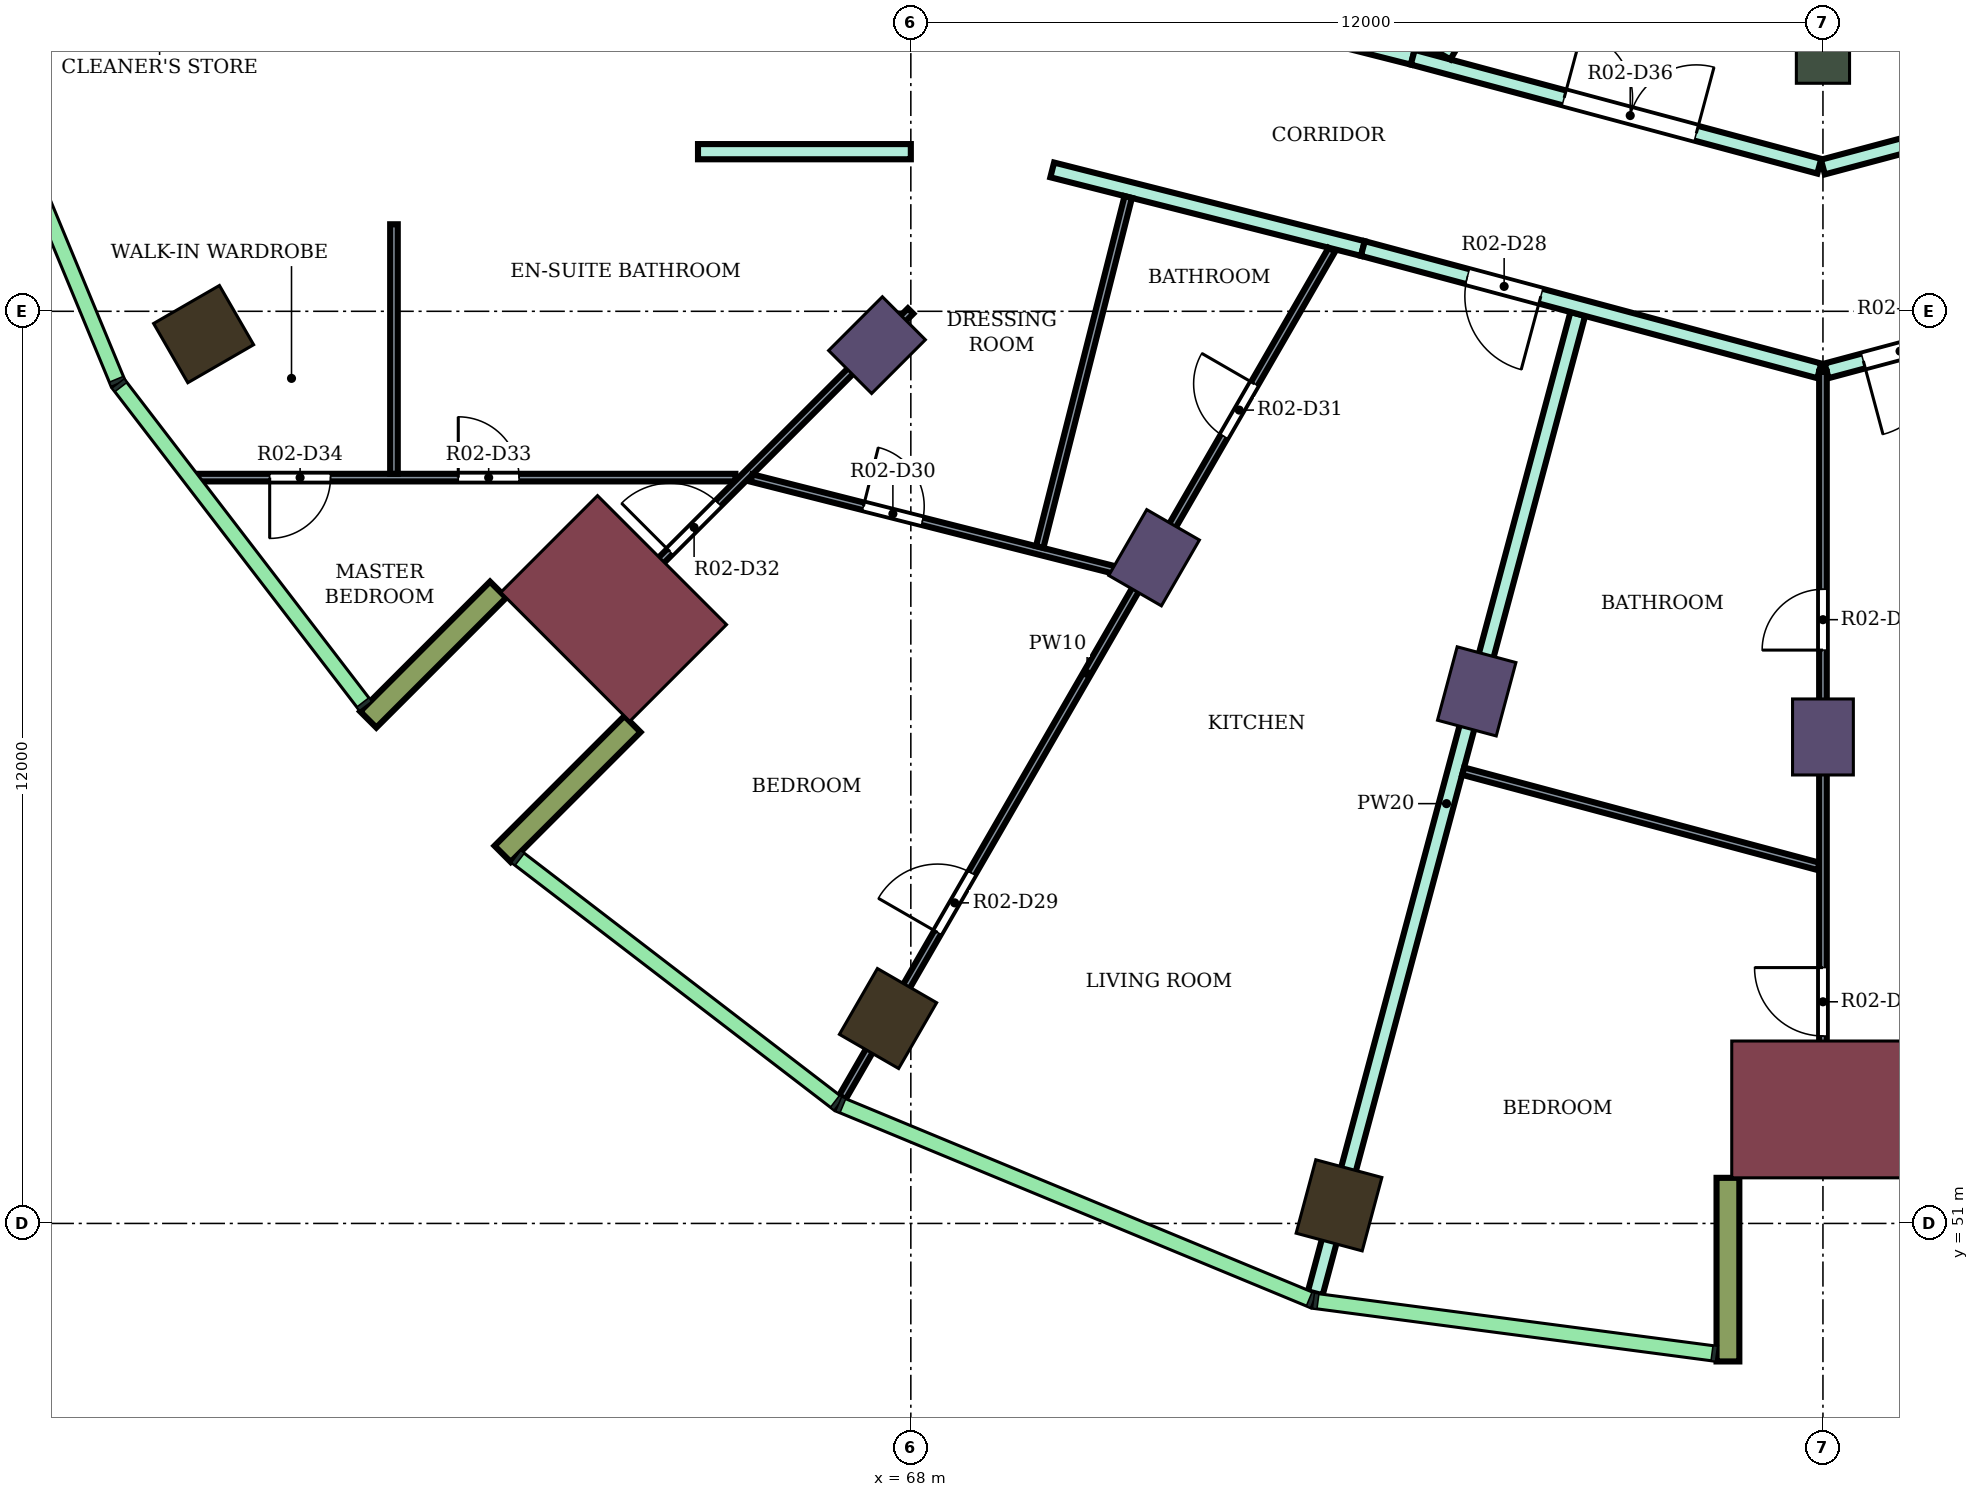
"""IFC4 building model, lengths in metres.
Left out: names, types, materials, properties, quantities, classifications, styles, units other than length and angle.
Written with IfcOpenShell. Run it as: python <this file> out.ifc"""

import sys

from ifc_helpers import new_model, si_unit, direction, frame, frame_2d, origin, origin_2d, place, context, subcontext, project, spatial, rectangle, extrude, element, fill, save


model = new_model("IFC4")
c1 = context("Model", 3, precision=1e-05, world=origin(), true_north=direction((0.0, 1.0)))
c2 = subcontext(c1, "Body", "Model", "MODEL_VIEW")
j1 = project(units=[si_unit("LENGTHUNIT", "METRE"), si_unit("PLANEANGLEUNIT", "RADIAN")], contexts=[c1])
p1 = place(None, origin())
s1 = spatial("IfcSite", under=j1, at=p1, CompositionType="ELEMENT")
p2 = place(p1, origin())
s2 = spatial("IfcBuilding", under=s1, at=p2, CompositionType="ELEMENT")
p3 = place(p2, frame((0.0, 0.0, 178.2)))
s3 = spatial("IfcBuildingStorey", under=s2, at=p3, CompositionType="ELEMENT", Elevation=178.2)
for number, where, z_axis, x_axis in (
    (1, (58.696, 62.7, 0.0), (0.0, 0.0, 1.0), (-0.866, -0.5, 0.0)),
    (2, (67.7, 53.696, 0.0), (0.0, 0.0, 1.0), (-0.5, -0.866, 0.0)),
    (3, (73.633, 51.238, 0.0), (0.0, 0.0, 1.0), (-0.259, -0.966, 0.0)),
):
    element("IfcColumn", number, at=place(p3, frame(where, z_axis=z_axis, x_axis=x_axis)), inside=s3, PredefinedType="COLUMN", context=c2, shape_type="SweptSolid", body=[
        extrude(rectangle(XDim=1.0, YDim=0.9, at=origin_2d()), origin(), (0.0, 0.0, 1.0), 4.1),
    ])
for number, where, z_axis, x_axis in (
    (4, (67.555, 62.555, 0.0), (0.0, 0.0, 1.0), (-0.707, -0.707, 0.0)),
    (5, (71.2, 59.758, 0.0), (0.0, 0.0, 1.0), (-0.5, -0.866, 0.0)),
    (6, (75.445, 58.0, 0.0), (0.0, 0.0, 1.0), (-0.259, -0.966, 0.0)),
    (7, (80.0, 57.4, 0.0), (0.0, 0.0, 1.0), (0.0, -1.0, 0.0)),
):
    element("IfcColumn", number, at=place(p3, frame(where, z_axis=z_axis, x_axis=x_axis)), inside=s3, PredefinedType="COLUMN", context=c2, shape_type="SweptSolid", body=[
        extrude(rectangle(XDim=1.0, YDim=0.8, at=origin_2d()), origin(), (0.0, 0.0, 1.0), 4.1),
    ])
p4 = place(p3, frame((80.0, 66.4, 0.0), z_axis=(0.0, 0.0, 1.0), x_axis=(0.0, -1.0, 0.0)))
e8 = element("IfcColumn", 8, at=p4, inside=s3, PredefinedType="COLUMN", context=c2, shape_type="SweptSolid", body=[
    extrude(rectangle(XDim=0.8, YDim=0.7, at=origin_2d()), origin(), (0.0, 0.0, 1.0), 4.1),
])
for number, where, z_axis, x_axis in (
    (9, (64.09, 59.09, 0.0), (0.0, 0.0, 1.0), (-0.707, -0.707, 0.0)),
    (10, (80.0, 52.5, 0.0), (0.0, 0.0, 1.0), (0.0, -1.0, 0.0)),
):
    element("IfcColumn", number, at=place(p3, frame(where, z_axis=z_axis, x_axis=x_axis)), inside=s3, PredefinedType="COLUMN", context=c2, shape_type="SweptSolid", body=[
        extrude(rectangle(XDim=1.8, YDim=2.4, at=origin_2d()), origin(), (0.0, 0.0, 1.0), 4.1),
    ])
for number, where, z_axis, x_axis in (
    (11, (62.57, 59.338, 0.0), (0.0, 0.0, 1.0), (-0.707, -0.707, 0.0)),
    (12, (64.338, 57.57, 0.0), (0.0, 0.0, 1.0), (-0.707, -0.707, 0.0)),
    (13, (78.75, 51.6, 0.0), (0.0, 0.0, 1.0), (0.0, -1.0, 0.0)),
):
    element("IfcWall", number, at=place(p3, frame(where, z_axis=z_axis, x_axis=x_axis)), inside=s3, PredefinedType="NOTDEFINED", context=c2, shape_type="SweptSolid", body=[
        extrude(rectangle(XDim=2.416, YDim=0.3, at=frame_2d((1.208, 0.0))), origin(), (0.0, 0.0, 1.0), 4.1),
    ])
p5 = place(p3, frame((65.2, 65.1, 0.0), z_axis=(0.0, 0.0, 1.0), x_axis=(1.0, 0.0, 0.0)))
e14 = element("IfcWall", 14, at=p5, inside=s3, PredefinedType="PARTITIONING", context=c2, shape_type="SweptSolid", body=[
    extrude(rectangle(XDim=2.8, YDim=0.2, at=frame_2d((1.4, 0.0))), origin(), (0.0, 0.0, 1.0), 3.65),
])
p6 = place(p3, frame((69.86, 64.86, 0.0), z_axis=(0.0, 0.0, 1.0), x_axis=(0.96942980222, -0.245368821506, 0.0)))
e15 = element("IfcWall", 15, at=p6, inside=s3, PredefinedType="PARTITIONING", context=c2, shape_type="SweptSolid", body=[
    extrude(rectangle(XDim=4.216, YDim=0.2, at=frame_2d((2.108, 0.0))), origin(), (0.0, 0.0, 1.0), 3.65),
])
p7 = place(p3, frame((72.1, 66.975, 0.0), z_axis=(0.0, 0.0, 1.0), x_axis=(0.969471314457, -0.245204752086, 0.0)))
e16 = element("IfcWall", 16, at=p7, inside=s3, PredefinedType="PARTITIONING", context=c2, shape_type="SweptSolid", body=[
    extrude(rectangle(XDim=2.582, YDim=0.2, at=frame_2d((1.291, 0.0))), origin(), (0.0, 0.0, 1.0), 3.65),
])
p8 = place(p7, frame((0.841, 0.0, 0.0)))
e17 = element("IfcOpeningElement", 17, at=p8, cuts=e16, PredefinedType="OPENING", context=c2, shape_type="SweptSolid", body=[
    extrude(rectangle(XDim=0.9, YDim=2.1, at=frame_2d((0.45, 1.05))), frame((0.0, 0.11, 0.0), z_axis=(0.0, -1.0, 0.0), x_axis=(1.0, 0.0, 0.0)), (0.0, 0.0, 1.0), 0.22),
])
p9 = place(p3, frame((73.321, 50.081, 0.0), z_axis=(0.0, 0.0, 1.0), x_axis=(0.258926994059, 0.965896894988, 0.0)))
e18 = element("IfcWall", 18, at=p9, inside=s3, PredefinedType="PARTITIONING", context=c2, shape_type="SweptSolid", body=[
    extrude(rectangle(XDim=13.338, YDim=0.2, at=frame_2d((6.669, 0.0))), origin(), (0.0, 0.0, 1.0), 3.65),
])
p10 = place(p3, frame((73.947, 63.826, 0.0), z_axis=(0.0, 0.0, 1.0), x_axis=(0.965908253407, -0.258884619088, 0.0)))
e19 = element("IfcWall", 19, at=p10, inside=s3, PredefinedType="PARTITIONING", context=c2, shape_type="SweptSolid", body=[
    extrude(rectangle(XDim=6.217, YDim=0.2, at=frame_2d((3.108, 0.0))), origin(), (0.0, 0.0, 1.0), 3.65),
])
p11 = place(p10, frame((1.424, 0.0, 0.0)))
e20 = element("IfcOpeningElement", 20, at=p11, cuts=e19, PredefinedType="OPENING", context=c2, shape_type="SweptSolid", body=[
    extrude(rectangle(XDim=1.0, YDim=2.1, at=frame_2d((0.5, 1.05))), frame((0.0, 0.11, 0.0), z_axis=(0.0, -1.0, 0.0), x_axis=(1.0, 0.0, 0.0)), (0.0, 0.0, 1.0), 0.22),
])
p12 = place(p3, frame((74.603, 66.342, 0.0), z_axis=(0.0, 0.0, 1.0), x_axis=(0.965895298152, -0.258932950796, 0.0)))
e21 = element("IfcWall", 21, at=p12, inside=s3, PredefinedType="PARTITIONING", context=c2, shape_type="SweptSolid", body=[
    extrude(rectangle(XDim=5.538, YDim=0.2, at=frame_2d((2.769, 0.0))), origin(), (0.0, 0.0, 1.0), 3.65),
])
p13 = place(p12, frame((2.062, 0.0, 0.0)))
e22 = element("IfcOpeningElement", 22, at=p13, cuts=e21, PredefinedType="OPENING", context=c2, shape_type="SweptSolid", body=[
    extrude(rectangle(XDim=1.8, YDim=2.1, at=frame_2d((0.9, 1.05))), frame((0.0, 0.11, 0.0), z_axis=(0.0, -1.0, 0.0), x_axis=(1.0, 0.0, 0.0)), (0.0, 0.0, 1.0), 0.22),
])
p14 = place(p3, frame((75.012, 66.363, 0.0), z_axis=(0.0, 0.0, 1.0), x_axis=(0.500168489725, 0.86592810434, 0.0)))
e23 = element("IfcWall", 23, at=p14, inside=s3, PredefinedType="PARTITIONING", context=c2, shape_type="SweptSolid", body=[
    extrude(rectangle(XDim=2.274, YDim=0.2, at=frame_2d((1.137, 0.0))), origin(), (0.0, 0.0, 1.0), 3.65),
])
p15 = place(p3, frame((80.0, 64.898, 0.0), z_axis=(0.0, 0.0, 1.0), x_axis=(0.966237419782, 0.257653349704, 0.0)))
e24 = element("IfcWall", 24, at=p15, inside=s3, PredefinedType="PARTITIONING", context=c2, shape_type="SweptSolid", body=[
    extrude(rectangle(XDim=8.169, YDim=0.2, at=frame_2d((4.084, 0.0))), origin(), (0.0, 0.0, 1.0), 3.65),
])
p16 = place(p15, frame((6.428, 0.0, 0.0)))
e25 = element("IfcOpeningElement", 25, at=p16, cuts=e24, PredefinedType="OPENING", context=c2, shape_type="SweptSolid", body=[
    extrude(rectangle(XDim=0.9, YDim=2.1, at=frame_2d((0.45, 1.05))), frame((0.0, 0.11, 0.0), z_axis=(0.0, -1.0, 0.0), x_axis=(1.0, 0.0, 0.0)), (0.0, 0.0, 1.0), 0.22),
])
p17 = place(p3, frame((80.048, 62.217, 0.0), z_axis=(0.0, 0.0, 1.0), x_axis=(0.965941520544, 0.258760466242, 0.0)))
e26 = element("IfcWall", 26, at=p17, inside=s3, PredefinedType="PARTITIONING", context=c2, shape_type="SweptSolid", body=[
    extrude(rectangle(XDim=6.006, YDim=0.2, at=frame_2d((3.003, 0.0))), origin(), (0.0, 0.0, 1.0), 3.65),
])
p18 = place(p17, frame((0.5, 0.0, 0.0)))
e27 = element("IfcOpeningElement", 27, at=p18, cuts=e26, PredefinedType="OPENING", context=c2, shape_type="SweptSolid", body=[
    extrude(rectangle(XDim=1.0, YDim=2.1, at=frame_2d((0.5, 1.05))), frame((0.0, 0.11, 0.0), z_axis=(0.0, -1.0, 0.0), x_axis=(1.0, 0.0, 0.0)), (0.0, 0.0, 1.0), 0.22),
])
p19 = place(p3, frame((58.6, 60.812, 0.0), z_axis=(0.0, 0.0, 1.0), x_axis=(1.0, 0.0, 0.0)))
e28 = element("IfcWall", 28, at=p19, inside=s3, PredefinedType="PARTITIONING", context=c2, shape_type="SweptSolid", body=[
    extrude(rectangle(XDim=7.092, YDim=0.1, at=frame_2d((3.546, 0.0))), origin(), (0.0, 0.0, 1.0), 3.65),
])
p20 = place(p19, frame((3.446, 0.0, 0.0)))
e29 = element("IfcOpeningElement", 29, at=p20, cuts=e28, PredefinedType="OPENING", context=c2, shape_type="SweptSolid", body=[
    extrude(rectangle(XDim=0.8, YDim=2.1, at=frame_2d((0.4, 1.05))), frame((0.0, 0.06, 0.0), z_axis=(0.0, -1.0, 0.0), x_axis=(1.0, 0.0, 0.0)), (0.0, 0.0, 1.0), 0.12),
])
p21 = place(p19, frame((0.965, 0.0, 0.0)))
e30 = element("IfcOpeningElement", 30, at=p21, cuts=e28, PredefinedType="OPENING", context=c2, shape_type="SweptSolid", body=[
    extrude(rectangle(XDim=0.8, YDim=2.1, at=frame_2d((0.4, 1.05))), frame((0.0, 0.06, 0.0), z_axis=(0.0, -1.0, 0.0), x_axis=(1.0, 0.0, 0.0)), (0.0, 0.0, 1.0), 0.12),
])
p22 = place(p3, frame((61.2, 60.862, 0.0), z_axis=(0.0, 0.0, 1.0), x_axis=(0.0, 1.0, 0.0)))
e31 = element("IfcWall", 31, at=p22, inside=s3, PredefinedType="PARTITIONING", context=c2, shape_type="SweptSolid", body=[
    extrude(rectangle(XDim=3.283, YDim=0.1, at=frame_2d((1.642, 0.0))), origin(), (0.0, 0.0, 1.0), 3.65),
])
p23 = place(p3, frame((63.591, 58.6, 0.0), z_axis=(0.0, 0.0, 1.0), x_axis=(0.707263550227, 0.706949977382, 0.0)))
e32 = element("IfcWall", 32, at=p23, inside=s3, PredefinedType="PARTITIONING", context=c2, shape_type="SweptSolid", body=[
    extrude(rectangle(XDim=6.229, YDim=0.1, at=frame_2d((3.114, 0.0))), origin(), (0.0, 0.0, 1.0), 3.65),
])
p24 = place(p23, frame((1.752, 0.0, 0.0)))
e33 = element("IfcOpeningElement", 33, at=p24, cuts=e32, PredefinedType="OPENING", context=c2, shape_type="SweptSolid", body=[
    extrude(rectangle(XDim=0.9, YDim=2.1, at=frame_2d((0.45, 1.05))), frame((0.0, 0.06, 0.0), z_axis=(0.0, -1.0, 0.0), x_axis=(1.0, 0.0, 0.0)), (0.0, 0.0, 1.0), 0.12),
])
p25 = place(p3, frame((65.904, 60.807, 0.0), z_axis=(0.0, 0.0, 1.0), x_axis=(0.969391307129, -0.245520861971, 0.0)))
e34 = element("IfcWall", 34, at=p25, inside=s3, PredefinedType="PARTITIONING", context=c2, shape_type="SweptSolid", body=[
    extrude(rectangle(XDim=5.251, YDim=0.1, at=frame_2d((2.625, 0.0))), origin(), (0.0, 0.0, 1.0), 3.65),
])
p26 = place(p25, frame((1.519, 0.0, 0.0)))
e35 = element("IfcOpeningElement", 35, at=p26, cuts=e34, PredefinedType="OPENING", context=c2, shape_type="SweptSolid", body=[
    extrude(rectangle(XDim=0.8, YDim=2.1, at=frame_2d((0.4, 1.05))), frame((0.0, 0.06, 0.0), z_axis=(0.0, -1.0, 0.0), x_axis=(1.0, 0.0, 0.0)), (0.0, 0.0, 1.0), 0.12),
])
p27 = place(p3, frame((67.1, 52.659, 0.0), z_axis=(0.0, 0.0, 1.0), x_axis=(0.500072574725, 0.865983498692, 0.0)))
e36 = element("IfcWall", 36, at=p27, inside=s3, PredefinedType="PARTITIONING", context=c2, shape_type="SweptSolid", body=[
    extrude(rectangle(XDim=12.876, YDim=0.1, at=frame_2d((6.438, 0.0))), origin(), (0.0, 0.0, 1.0), 3.65),
])
p28 = place(p27, frame((2.504, 0.0, 0.0)))
e37 = element("IfcOpeningElement", 37, at=p28, cuts=e36, PredefinedType="OPENING", context=c2, shape_type="SweptSolid", body=[
    extrude(rectangle(XDim=0.9, YDim=2.1, at=frame_2d((0.45, 1.05))), frame((0.0, 0.06, 0.0), z_axis=(0.0, -1.0, 0.0), x_axis=(1.0, 0.0, 0.0)), (0.0, 0.0, 1.0), 0.12),
])
p29 = place(p27, frame((10.04, 0.0, 0.0)))
e38 = element("IfcOpeningElement", 38, at=p29, cuts=e36, PredefinedType="OPENING", context=c2, shape_type="SweptSolid", body=[
    extrude(rectangle(XDim=0.8, YDim=2.1, at=frame_2d((0.4, 1.05))), frame((0.0, 0.06, 0.0), z_axis=(0.0, -1.0, 0.0), x_axis=(1.0, 0.0, 0.0)), (0.0, 0.0, 1.0), 0.12),
])
p30 = place(p3, frame((69.695, 59.899, 0.0), z_axis=(0.0, 0.0, 1.0), x_axis=(0.245292232594, 0.96944918414, 0.0)))
e39 = element("IfcWall", 39, at=p30, inside=s3, PredefinedType="PARTITIONING", context=c2, shape_type="SweptSolid", body=[
    extrude(rectangle(XDim=4.75, YDim=0.1, at=frame_2d((2.375, 0.0))), origin(), (0.0, 0.0, 1.0), 3.65),
])
p31 = place(p3, frame((75.267, 56.95, 0.0), z_axis=(0.0, 0.0, 1.0), x_axis=(0.965934541962, -0.258786515577, 0.0)))
e40 = element("IfcWall", 40, at=p31, inside=s3, PredefinedType="PARTITIONING", context=c2, shape_type="SweptSolid", body=[
    extrude(rectangle(XDim=4.84, YDim=0.1, at=frame_2d((2.42, 0.0))), origin(), (0.0, 0.0, 1.0), 3.65),
])
p32 = place(p3, frame((80.0, 51.8, 0.0), z_axis=(0.0, 0.0, 1.0), x_axis=(0.0, 1.0, 0.0)))
e41 = element("IfcWall", 41, at=p32, inside=s3, PredefinedType="PARTITIONING", context=c2, shape_type="SweptSolid", body=[
    extrude(rectangle(XDim=10.404, YDim=0.1, at=frame_2d((5.202, 0.0))), origin(), (0.0, 0.0, 1.0), 3.65),
])
p33 = place(p32, frame((1.666, 0.0, 0.0)))
e42 = element("IfcOpeningElement", 42, at=p33, cuts=e41, PredefinedType="OPENING", context=c2, shape_type="SweptSolid", body=[
    extrude(rectangle(XDim=0.9, YDim=2.1, at=frame_2d((0.45, 1.05))), frame((0.0, 0.06, 0.0), z_axis=(0.0, -1.0, 0.0), x_axis=(1.0, 0.0, 0.0)), (0.0, 0.0, 1.0), 0.12),
])
p34 = place(p32, frame((6.743, 0.0, 0.0)))
e43 = element("IfcOpeningElement", 43, at=p34, cuts=e41, PredefinedType="OPENING", context=c2, shape_type="SweptSolid", body=[
    extrude(rectangle(XDim=0.8, YDim=2.1, at=frame_2d((0.4, 1.05))), frame((0.0, 0.06, 0.0), z_axis=(0.0, -1.0, 0.0), x_axis=(1.0, 0.0, 0.0)), (0.0, 0.0, 1.0), 0.12),
])
p35 = place(p18, frame((1.0, 0.0, 0.0), z_axis=(0.0, 0.0, 1.0), x_axis=(-1.0, 0.0, 0.0)))
e44 = element("IfcDoor", 44, at=p35, inside=s3, OperationType="SINGLE_SWING_RIGHT", PredefinedType="DOOR", context=c2, shape_type="SweptSolid", body=[
    extrude(rectangle(XDim=1.0, YDim=2.1, at=frame_2d((0.5, 1.05))), frame((0.0, 0.025, 0.0), z_axis=(0.0, -1.0, 0.0), x_axis=(1.0, 0.0, 0.0)), (0.0, 0.0, 1.0), 0.05),
])
fill(e27, e44)
p36 = place(p33, origin())
e45 = element("IfcDoor", 45, at=p36, inside=s3, OperationType="SINGLE_SWING_RIGHT", PredefinedType="DOOR", context=c2, shape_type="SweptSolid", body=[
    extrude(rectangle(XDim=0.9, YDim=2.1, at=frame_2d((0.45, 1.05))), frame((0.0, 0.025, 0.0), z_axis=(0.0, -1.0, 0.0), x_axis=(1.0, 0.0, 0.0)), (0.0, 0.0, 1.0), 0.05),
])
fill(e42, e45)
p37 = place(p34, origin())
e46 = element("IfcDoor", 46, at=p37, inside=s3, OperationType="SINGLE_SWING_LEFT", PredefinedType="DOOR", context=c2, shape_type="SweptSolid", body=[
    extrude(rectangle(XDim=0.8, YDim=2.1, at=frame_2d((0.4, 1.05))), frame((0.0, 0.025, 0.0), z_axis=(0.0, -1.0, 0.0), x_axis=(1.0, 0.0, 0.0)), (0.0, 0.0, 1.0), 0.05),
])
fill(e43, e46)
p38 = place(p11, frame((1.0, 0.0, 0.0), z_axis=(0.0, 0.0, 1.0), x_axis=(-1.0, 0.0, 0.0)))
e47 = element("IfcDoor", 47, at=p38, inside=s3, OperationType="SINGLE_SWING_LEFT", PredefinedType="DOOR", context=c2, shape_type="SweptSolid", body=[
    extrude(rectangle(XDim=1.0, YDim=2.1, at=frame_2d((0.5, 1.05))), frame((0.0, 0.025, 0.0), z_axis=(0.0, -1.0, 0.0), x_axis=(1.0, 0.0, 0.0)), (0.0, 0.0, 1.0), 0.05),
])
fill(e20, e47)
p39 = place(p28, origin())
e48 = element("IfcDoor", 48, at=p39, inside=s3, OperationType="SINGLE_SWING_LEFT", PredefinedType="DOOR", context=c2, shape_type="SweptSolid", body=[
    extrude(rectangle(XDim=0.9, YDim=2.1, at=frame_2d((0.45, 1.05))), frame((0.0, 0.025, 0.0), z_axis=(0.0, -1.0, 0.0), x_axis=(1.0, 0.0, 0.0)), (0.0, 0.0, 1.0), 0.05),
])
fill(e37, e48)
p40 = place(p26, origin())
e49 = element("IfcDoor", 49, at=p40, inside=s3, OperationType="SINGLE_SWING_LEFT", PredefinedType="DOOR", context=c2, shape_type="SweptSolid", body=[
    extrude(rectangle(XDim=0.8, YDim=2.1, at=frame_2d((0.4, 1.05))), frame((0.0, 0.025, 0.0), z_axis=(0.0, -1.0, 0.0), x_axis=(1.0, 0.0, 0.0)), (0.0, 0.0, 1.0), 0.05),
])
fill(e35, e49)
p41 = place(p29, origin())
e50 = element("IfcDoor", 50, at=p41, inside=s3, OperationType="SINGLE_SWING_RIGHT", PredefinedType="DOOR", context=c2, shape_type="SweptSolid", body=[
    extrude(rectangle(XDim=0.8, YDim=2.1, at=frame_2d((0.4, 1.05))), frame((0.0, 0.025, 0.0), z_axis=(0.0, -1.0, 0.0), x_axis=(1.0, 0.0, 0.0)), (0.0, 0.0, 1.0), 0.05),
])
fill(e38, e50)
p42 = place(p24, origin())
e51 = element("IfcDoor", 51, at=p42, inside=s3, OperationType="SINGLE_SWING_LEFT", PredefinedType="DOOR", context=c2, shape_type="SweptSolid", body=[
    extrude(rectangle(XDim=0.9, YDim=2.1, at=frame_2d((0.45, 1.05))), frame((0.0, 0.025, 0.0), z_axis=(0.0, -1.0, 0.0), x_axis=(1.0, 0.0, 0.0)), (0.0, 0.0, 1.0), 0.05),
])
fill(e33, e51)
p43 = place(p20, origin())
e52 = element("IfcDoor", 52, at=p43, inside=s3, OperationType="SINGLE_SWING_LEFT", PredefinedType="DOOR", context=c2, shape_type="SweptSolid", body=[
    extrude(rectangle(XDim=0.8, YDim=2.1, at=frame_2d((0.4, 1.05))), frame((0.0, 0.025, 0.0), z_axis=(0.0, -1.0, 0.0), x_axis=(1.0, 0.0, 0.0)), (0.0, 0.0, 1.0), 0.05),
])
fill(e29, e52)
p44 = place(p21, frame((0.8, 0.0, 0.0), z_axis=(0.0, 0.0, 1.0), x_axis=(-1.0, 0.0, 0.0)))
e53 = element("IfcDoor", 53, at=p44, inside=s3, OperationType="SINGLE_SWING_RIGHT", PredefinedType="DOOR", context=c2, shape_type="SweptSolid", body=[
    extrude(rectangle(XDim=0.8, YDim=2.1, at=frame_2d((0.4, 1.05))), frame((0.0, 0.025, 0.0), z_axis=(0.0, -1.0, 0.0), x_axis=(1.0, 0.0, 0.0)), (0.0, 0.0, 1.0), 0.05),
])
fill(e30, e53)
p45 = place(p13, origin())
e54 = element("IfcDoor", 54, at=p45, inside=s3, OperationType="DOUBLE_DOOR_SINGLE_SWING", PredefinedType="DOOR", context=c2, shape_type="SweptSolid", body=[
    extrude(rectangle(XDim=1.8, YDim=2.1, at=frame_2d((0.9, 1.05))), frame((0.0, 0.025, 0.0), z_axis=(0.0, -1.0, 0.0), x_axis=(1.0, 0.0, 0.0)), (0.0, 0.0, 1.0), 0.05),
])
fill(e22, e54)
save(model, sys.argv[1])
